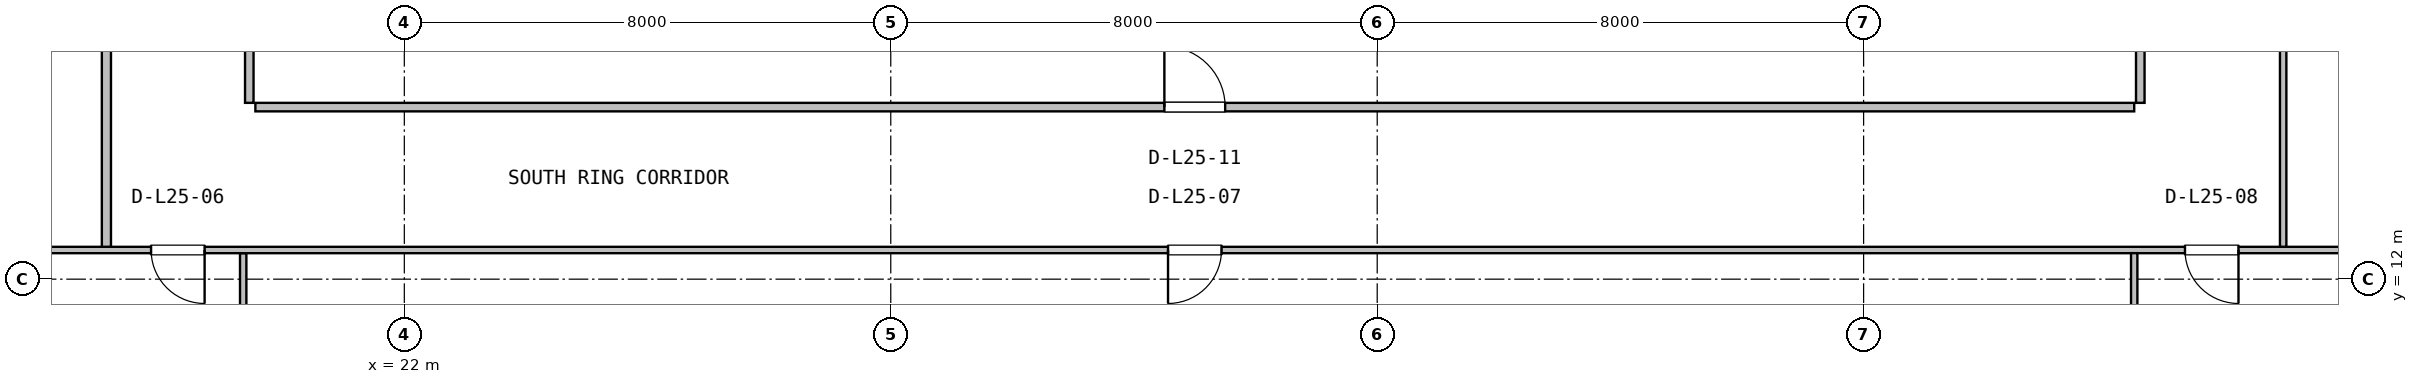
"""IFC4 building model, lengths in metres.
Left out: names, types, materials, properties, quantities, classifications, styles, units other than length and angle.
Written with IfcOpenShell. Run it as: python <this file> out.ifc"""

import sys

from ifc_helpers import new_model, si_unit, direction, frame, frame_2d, origin, place, context, subcontext, project, spatial, rectangle, extrude, source, transform, mapped, element, fill, save


model = new_model("IFC4")
c1 = context("Model", 3, precision=1e-05, world=origin(), true_north=direction((0.0, 1.0)))
c2 = subcontext(c1, "Body", "Model", "MODEL_VIEW")
j1 = project(units=[si_unit("LENGTHUNIT", "METRE"), si_unit("PLANEANGLEUNIT", "RADIAN")], contexts=[c1])
p1 = place(None, origin())
s1 = spatial("IfcSite", under=j1, at=p1, CompositionType="ELEMENT")
p2 = place(p1, origin())
s2 = spatial("IfcBuilding", under=s1, at=p2, CompositionType="ELEMENT")
p3 = place(p2, frame((0.0, 0.0, 106.8)))
s3 = spatial("IfcBuildingStorey", under=s2, at=p3, CompositionType="ELEMENT", Elevation=106.8)
p4 = place(p3, frame((19.35, 5.55, 0.0), z_axis=(0.0, 0.0, 1.0), x_axis=(0.0, 1.0, 0.0)))
e1 = element("IfcWall", 1, at=p4, inside=s3, PredefinedType="PARTITIONING", context=c2, shape_type="SweptSolid", body=[
    extrude(rectangle(XDim=6.878, YDim=0.105, at=frame_2d((3.439, 0.0))), origin(), (0.0, 0.0, 1.0), 3.222),
])
p5 = place(p3, frame((4.68, 12.48, 0.0), z_axis=(0.0, 0.0, 1.0), x_axis=(1.0, 0.0, 0.0)))
e2 = element("IfcWall", 2, at=p5, inside=s3, PredefinedType="PARTITIONING", context=c2, shape_type="SweptSolid", body=[
    extrude(rectangle(XDim=58.64, YDim=0.105, at=frame_2d((29.32, 0.0))), origin(), (0.0, 0.0, 1.0), 2.83),
])
p6 = place(p5, frame((13.155, 0.0, 0.0)))
e3 = element("IfcOpeningElement", 3, at=p6, cuts=e2, PredefinedType="OPENING", context=c2, shape_type="SweptSolid", body=[
    extrude(rectangle(XDim=0.88, YDim=2.06, at=frame_2d((0.44, 1.03))), frame((0.0, 0.062, 0.0), z_axis=(0.0, -1.0, 0.0), x_axis=(1.0, 0.0, 0.0)), (0.0, 0.0, 1.0), 0.125),
])
p7 = place(p5, frame((29.88, 0.0, 0.0)))
e4 = element("IfcOpeningElement", 4, at=p7, cuts=e2, PredefinedType="OPENING", context=c2, shape_type="SweptSolid", body=[
    extrude(rectangle(XDim=0.88, YDim=2.06, at=frame_2d((0.44, 1.03))), frame((0.0, 0.062, 0.0), z_axis=(0.0, -1.0, 0.0), x_axis=(1.0, 0.0, 0.0)), (0.0, 0.0, 1.0), 0.125),
])
p8 = place(p5, frame((46.605, 0.0, 0.0)))
e5 = element("IfcOpeningElement", 5, at=p8, cuts=e2, PredefinedType="OPENING", context=c2, shape_type="SweptSolid", body=[
    extrude(rectangle(XDim=0.88, YDim=2.06, at=frame_2d((0.44, 1.03))), frame((0.0, 0.062, 0.0), z_axis=(0.0, -1.0, 0.0), x_axis=(1.0, 0.0, 0.0)), (0.0, 0.0, 1.0), 0.125),
])
p9 = place(p3, frame((50.45, 4.38, 0.0), z_axis=(0.0, 0.0, 1.0), x_axis=(0.0, 1.0, 0.0)))
e6 = element("IfcWall", 6, at=p9, inside=s3, PredefinedType="PARTITIONING", context=c2, shape_type="SweptSolid", body=[
    extrude(rectangle(XDim=8.048, YDim=0.105, at=frame_2d((4.024, 0.0))), origin(), (0.0, 0.0, 1.0), 3.108),
])
p10 = place(p3, frame((17.1, 12.533, 0.0), z_axis=(0.0, 0.0, 1.0), x_axis=(0.0, 1.0, 0.0)))
e7 = element("IfcWall", 7, at=p10, inside=s3, PredefinedType="PARTITIONING", context=c2, shape_type="SweptSolid", body=[
    extrude(rectangle(XDim=20.73, YDim=0.15, at=frame_2d((10.365, 0.0))), origin(), (0.0, 0.0, 1.0), 3.222),
])
p11 = place(p10, frame((5.427, 0.0, 0.0)))
e8 = element("IfcOpeningElement", 8, at=p11, cuts=e7, PredefinedType="OPENING", context=c2, shape_type="SweptSolid", body=[
    extrude(rectangle(XDim=0.92, YDim=2.08, at=frame_2d((0.46, 1.04))), frame((0.0, 0.085, 0.0), z_axis=(0.0, -1.0, 0.0), x_axis=(1.0, 0.0, 0.0)), (0.0, 0.0, 1.0), 0.17),
])
p12 = place(p10, frame((15.797, 0.0, 0.0)))
e9 = element("IfcOpeningElement", 9, at=p12, cuts=e7, PredefinedType="OPENING", context=c2, shape_type="SweptSolid", body=[
    extrude(rectangle(XDim=1.05, YDim=2.1, at=frame_2d((0.525, 1.05))), frame((0.0, 0.085, 0.0), z_axis=(0.0, -1.0, 0.0), x_axis=(1.0, 0.0, 0.0)), (0.0, 0.0, 1.0), 0.17),
])
p13 = place(p3, frame((19.55, 14.83, 0.0), z_axis=(0.0, 0.0, 1.0), x_axis=(1.0, 0.0, 0.0)))
e10 = element("IfcWall", 10, at=p13, inside=s3, PredefinedType="PARTITIONING", context=c2, shape_type="SweptSolid", body=[
    extrude(rectangle(XDim=30.9, YDim=0.14, at=frame_2d((15.45, 0.0))), origin(), (0.0, 0.0, 1.0), 2.83),
])
p14 = place(p13, frame((14.95, 0.0, 0.0)))
e11 = element("IfcOpeningElement", 11, at=p14, cuts=e10, PredefinedType="OPENING", context=c2, shape_type="SweptSolid", body=[
    extrude(rectangle(XDim=1.0, YDim=2.1, at=frame_2d((0.5, 1.05))), frame((0.0, 0.08, 0.0), z_axis=(0.0, -1.0, 0.0), x_axis=(1.0, 0.0, 0.0)), (0.0, 0.0, 1.0), 0.16),
])
for number, where, z_axis, x_axis in (
    (12, (50.55, 14.9, 0.0), (0.0, 0.0, 1.0), (0.0, 1.0, 0.0)),
    (13, (19.45, 14.9, 0.0), (0.0, 0.0, 1.0), (0.0, 1.0, 0.0)),
):
    element("IfcWall", number, at=place(p3, frame(where, z_axis=z_axis, x_axis=x_axis)), inside=s3, PredefinedType="PARTITIONING", context=c2, shape_type="SweptSolid", body=[
        extrude(rectangle(XDim=18.375, YDim=0.14, at=frame_2d((9.188, 0.0))), origin(), (0.0, 0.0, 1.0), 3.222),
    ])
p15 = place(p3, frame((52.9, 12.533, 0.0), z_axis=(0.0, 0.0, 1.0), x_axis=(0.0, 1.0, 0.0)))
e14 = element("IfcWall", 14, at=p15, inside=s3, PredefinedType="PARTITIONING", context=c2, shape_type="SweptSolid", body=[
    extrude(rectangle(XDim=20.764, YDim=0.105, at=frame_2d((10.382, 0.0))), origin(), (0.0, 0.0, 1.0), 3.222),
])
p16 = place(p15, frame((9.942, 0.0, 0.0)))
e15 = element("IfcOpeningElement", 15, at=p16, cuts=e14, PredefinedType="OPENING", context=c2, shape_type="SweptSolid", body=[
    extrude(rectangle(XDim=0.88, YDim=2.06, at=frame_2d((0.44, 1.03))), frame((0.0, 0.062, 0.0), z_axis=(0.0, -1.0, 0.0), x_axis=(1.0, 0.0, 0.0)), (0.0, 0.0, 1.0), 0.125),
])
m1 = source(origin(), c2, "Body", "SweptSolid", [
    extrude(rectangle(XDim=0.88, YDim=2.06, at=frame_2d((0.44, 1.03))), frame((0.0, 0.025, 0.0), z_axis=(0.0, -1.0, 0.0), x_axis=(1.0, 0.0, 0.0)), (0.0, 0.0, 1.0), 0.05),
])
p17 = place(p6, frame((0.88, 0.0, 0.0), z_axis=(0.0, 0.0, 1.0), x_axis=(-1.0, 0.0, 0.0)))
e16 = element("IfcDoor", 16, at=p17, inside=s3, OperationType="SINGLE_SWING_RIGHT", PredefinedType="DOOR", context=c2, shape_type="MappedRepresentation", body=[
    mapped(m1, transform((0.0, 0.0, 0.0), x_axis=(1.0, 0.0, 0.0), y_axis=(0.0, 1.0, 0.0), z_axis=(0.0, 0.0, 1.0), scale=1.0)),
])
fill(e3, e16)
p18 = place(p7, frame((0.88, 0.0, 0.0), z_axis=(0.0, 0.0, 1.0), x_axis=(-1.0, 0.0, 0.0)))
e17 = element("IfcDoor", 17, at=p18, inside=s3, OperationType="SINGLE_SWING_LEFT", PredefinedType="DOOR", context=c2, shape_type="MappedRepresentation", body=[
    mapped(m1, transform((0.0, 0.0, 0.0), x_axis=(1.0, 0.0, 0.0), y_axis=(0.0, 1.0, 0.0), z_axis=(0.0, 0.0, 1.0), scale=1.0)),
])
fill(e4, e17)
p19 = place(p8, frame((0.88, 0.0, 0.0), z_axis=(0.0, 0.0, 1.0), x_axis=(-1.0, 0.0, 0.0)))
e18 = element("IfcDoor", 18, at=p19, inside=s3, OperationType="SINGLE_SWING_RIGHT", PredefinedType="DOOR", context=c2, shape_type="MappedRepresentation", body=[
    mapped(m1, transform((0.0, 0.0, 0.0), x_axis=(1.0, 0.0, 0.0), y_axis=(0.0, 1.0, 0.0), z_axis=(0.0, 0.0, 1.0), scale=1.0)),
])
fill(e5, e18)
m2 = source(origin(), c2, "Body", "SweptSolid", [
    extrude(rectangle(XDim=1.0, YDim=2.1, at=frame_2d((0.5, 1.05))), frame((0.0, 0.025, 0.0), z_axis=(0.0, -1.0, 0.0), x_axis=(1.0, 0.0, 0.0)), (0.0, 0.0, 1.0), 0.05),
])
p20 = place(p14, origin())
e19 = element("IfcDoor", 19, at=p20, inside=s3, OperationType="SINGLE_SWING_LEFT", PredefinedType="DOOR", context=c2, shape_type="MappedRepresentation", body=[
    mapped(m2, transform((0.0, 0.0, 0.0), x_axis=(1.0, 0.0, 0.0), y_axis=(0.0, 1.0, 0.0), z_axis=(0.0, 0.0, 1.0), scale=1.0)),
])
fill(e11, e19)
save(model, sys.argv[1])
